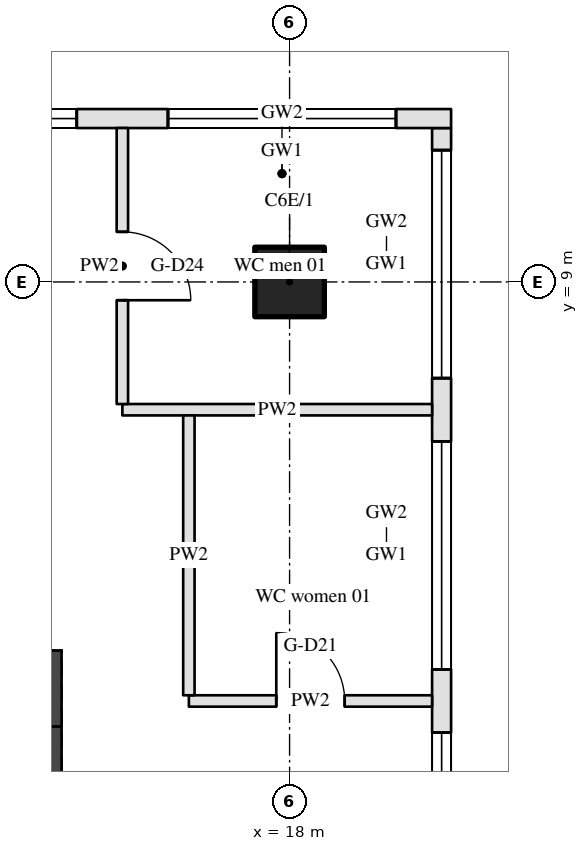
"""IFC4 building model, lengths in metres.
Left out: names, types, materials, properties, quantities, classifications, styles, units other than length and angle.
Written with IfcOpenShell. Run it as: python <this file> out.ifc"""

import sys

from ifc_helpers import new_model, si_unit, direction, frame, frame_2d, origin, origin_2d, place, context, subcontext, project, spatial, rectangle, hollow_circle, extrude, element, fill, save


model = new_model("IFC4")
c1 = context("Model", 3, precision=1e-05, world=origin(), true_north=direction((0.0, 1.0)))
c2 = subcontext(c1, "Body", "Model", "MODEL_VIEW")
j1 = project(units=[si_unit("LENGTHUNIT", "METRE"), si_unit("PLANEANGLEUNIT", "RADIAN")], contexts=[c1])
p1 = place(None, origin())
s1 = spatial("IfcSite", under=j1, at=p1, CompositionType="ELEMENT")
p2 = place(p1, origin())
s2 = spatial("IfcBuilding", under=s1, at=p2, CompositionType="ELEMENT")
p3 = place(p2, origin())
s3 = spatial("IfcBuildingStorey", under=s2, at=p3, CompositionType="ELEMENT", Elevation=0.0)
p4 = place(p3, frame((18.0, 9.0, 0.0), z_axis=(0.0, 0.0, 1.0), x_axis=(1.0, 0.0, 0.0)))
e1 = element("IfcColumn", 1, at=p4, inside=s3, PredefinedType="COLUMN", context=c2, shape_type="SweptSolid", body=[
    extrude(hollow_circle(Radius=0.457, WallThickness=0.05, at=origin_2d()), origin(), (0.0, 0.0, 1.0), 10.8),
])
p5 = place(p3, frame((-15.0, 3.65, 0.0), z_axis=(0.0, 0.0, 1.0), x_axis=(1.0, 0.0, 0.0)))
e2 = element("IfcWall", 2, at=p5, inside=s3, PredefinedType="SHEAR", context=c2, shape_type="SweptSolid", body=[
    extrude(rectangle(XDim=30.0, YDim=1.0, at=frame_2d((15.0, 0.0))), origin(), (0.0, 0.0, 1.0), 10.8),
])
p6 = place(p3, frame((14.5, -11.5, 0.0), z_axis=(0.0, 0.0, 1.0), x_axis=(0.0, 1.0, 0.0)))
e3 = element("IfcWall", 3, at=p6, inside=s3, PredefinedType="SHEAR", context=c2, shape_type="SweptSolid", body=[
    extrude(rectangle(XDim=14.65, YDim=1.0, at=frame_2d((7.325, 0.0))), origin(), (0.0, 0.0, 1.0), 10.8),
])
p7 = place(p6, frame((9.6, 0.0, 0.0)))
e4 = element("IfcOpeningElement", 4, at=p7, cuts=e3, PredefinedType="OPENING", context=c2, shape_type="SweptSolid", body=[
    extrude(rectangle(XDim=1.8, YDim=2.1, at=frame_2d((0.9, 1.05))), frame((0.0, 0.51, 0.0), z_axis=(0.0, -1.0, 0.0), x_axis=(1.0, 0.0, 0.0)), (0.0, 0.0, 1.0), 1.02),
])
p8 = place(p6, frame((4.6, 0.0, 0.0)))
e5 = element("IfcOpeningElement", 5, at=p8, cuts=e3, PredefinedType="OPENING", context=c2, shape_type="SweptSolid", body=[
    extrude(rectangle(XDim=1.8, YDim=2.1, at=frame_2d((0.9, 1.05))), frame((0.0, 0.51, 0.0), z_axis=(0.0, -1.0, 0.0), x_axis=(1.0, 0.0, 0.0)), (0.0, 0.0, 1.0), 1.02),
])
p9 = place(p3, frame((20.0, -19.375, 0.0), z_axis=(0.0, 0.0, 1.0), x_axis=(0.0, 1.0, 0.0)))
e6 = element("IfcWall", 6, at=p9, inside=s3, PredefinedType="STANDARD", context=c2, shape_type="SweptSolid", body=[
    extrude(rectangle(XDim=30.4, YDim=0.25, at=frame_2d((15.2, 0.0))), origin(), (0.0, 0.0, 1.0), 10.0),
])
p10 = place(p9, frame((0.291, 0.0, 0.15)))
e7 = element("IfcOpeningElement", 7, at=p10, cuts=e6, PredefinedType="OPENING", context=c2, shape_type="SweptSolid", body=[
    extrude(rectangle(XDim=3.0, YDim=4.2, at=frame_2d((1.5, 2.1))), frame((0.0, 0.135, 0.0), z_axis=(0.0, -1.0, 0.0), x_axis=(1.0, 0.0, 0.0)), (0.0, 0.0, 1.0), 0.27),
])
p11 = place(p9, frame((0.291, 0.0, 4.95)))
e8 = element("IfcOpeningElement", 8, at=p11, cuts=e6, PredefinedType="OPENING", context=c2, shape_type="SweptSolid", body=[
    extrude(rectangle(XDim=3.0, YDim=4.4, at=frame_2d((1.5, 2.2))), frame((0.0, 0.135, 0.0), z_axis=(0.0, -1.0, 0.0), x_axis=(1.0, 0.0, 0.0)), (0.0, 0.0, 1.0), 0.27),
])
p12 = place(p9, frame((4.122, 0.0, 0.15)))
e9 = element("IfcOpeningElement", 9, at=p12, cuts=e6, PredefinedType="OPENING", context=c2, shape_type="SweptSolid", body=[
    extrude(rectangle(XDim=3.0, YDim=4.2, at=frame_2d((1.5, 2.1))), frame((0.0, 0.135, 0.0), z_axis=(0.0, -1.0, 0.0), x_axis=(1.0, 0.0, 0.0)), (0.0, 0.0, 1.0), 0.27),
])
p13 = place(p9, frame((4.122, 0.0, 4.95)))
e10 = element("IfcOpeningElement", 10, at=p13, cuts=e6, PredefinedType="OPENING", context=c2, shape_type="SweptSolid", body=[
    extrude(rectangle(XDim=3.0, YDim=4.4, at=frame_2d((1.5, 2.2))), frame((0.0, 0.135, 0.0), z_axis=(0.0, -1.0, 0.0), x_axis=(1.0, 0.0, 0.0)), (0.0, 0.0, 1.0), 0.27),
])
p14 = place(p9, frame((7.953, 0.0, 0.15)))
e11 = element("IfcOpeningElement", 11, at=p14, cuts=e6, PredefinedType="OPENING", context=c2, shape_type="SweptSolid", body=[
    extrude(rectangle(XDim=3.0, YDim=4.2, at=frame_2d((1.5, 2.1))), frame((0.0, 0.135, 0.0), z_axis=(0.0, -1.0, 0.0), x_axis=(1.0, 0.0, 0.0)), (0.0, 0.0, 1.0), 0.27),
])
p15 = place(p9, frame((7.953, 0.0, 4.95)))
e12 = element("IfcOpeningElement", 12, at=p15, cuts=e6, PredefinedType="OPENING", context=c2, shape_type="SweptSolid", body=[
    extrude(rectangle(XDim=3.0, YDim=4.4, at=frame_2d((1.5, 2.2))), frame((0.0, 0.135, 0.0), z_axis=(0.0, -1.0, 0.0), x_axis=(1.0, 0.0, 0.0)), (0.0, 0.0, 1.0), 0.27),
])
p16 = place(p9, frame((12.084, 0.0, 0.0)))
e13 = element("IfcOpeningElement", 13, at=p16, cuts=e6, PredefinedType="OPENING", context=c2, shape_type="SweptSolid", body=[
    extrude(rectangle(XDim=2.4, YDim=2.6, at=frame_2d((1.2, 1.3))), frame((0.0, 0.135, 0.0), z_axis=(0.0, -1.0, 0.0), x_axis=(1.0, 0.0, 0.0)), (0.0, 0.0, 1.0), 0.27),
])
p17 = place(p9, frame((11.784, 0.0, 2.9)))
e14 = element("IfcOpeningElement", 14, at=p17, cuts=e6, PredefinedType="OPENING", context=c2, shape_type="SweptSolid", body=[
    extrude(rectangle(XDim=3.0, YDim=1.45, at=frame_2d((1.5, 0.725))), frame((0.0, 0.135, 0.0), z_axis=(0.0, -1.0, 0.0), x_axis=(1.0, 0.0, 0.0)), (0.0, 0.0, 1.0), 0.27),
])
p18 = place(p9, frame((11.784, 0.0, 4.95)))
e15 = element("IfcOpeningElement", 15, at=p18, cuts=e6, PredefinedType="OPENING", context=c2, shape_type="SweptSolid", body=[
    extrude(rectangle(XDim=3.0, YDim=4.4, at=frame_2d((1.5, 2.2))), frame((0.0, 0.135, 0.0), z_axis=(0.0, -1.0, 0.0), x_axis=(1.0, 0.0, 0.0)), (0.0, 0.0, 1.0), 0.27),
])
p19 = place(p9, frame((15.616, 0.0, 0.15)))
e16 = element("IfcOpeningElement", 16, at=p19, cuts=e6, PredefinedType="OPENING", context=c2, shape_type="SweptSolid", body=[
    extrude(rectangle(XDim=3.0, YDim=4.2, at=frame_2d((1.5, 2.1))), frame((0.0, 0.135, 0.0), z_axis=(0.0, -1.0, 0.0), x_axis=(1.0, 0.0, 0.0)), (0.0, 0.0, 1.0), 0.27),
])
p20 = place(p9, frame((15.616, 0.0, 4.95)))
e17 = element("IfcOpeningElement", 17, at=p20, cuts=e6, PredefinedType="OPENING", context=c2, shape_type="SweptSolid", body=[
    extrude(rectangle(XDim=3.0, YDim=4.4, at=frame_2d((1.5, 2.2))), frame((0.0, 0.135, 0.0), z_axis=(0.0, -1.0, 0.0), x_axis=(1.0, 0.0, 0.0)), (0.0, 0.0, 1.0), 0.27),
])
p21 = place(p9, frame((19.447, 0.0, 0.15)))
e18 = element("IfcOpeningElement", 18, at=p21, cuts=e6, PredefinedType="OPENING", context=c2, shape_type="SweptSolid", body=[
    extrude(rectangle(XDim=3.0, YDim=4.2, at=frame_2d((1.5, 2.1))), frame((0.0, 0.135, 0.0), z_axis=(0.0, -1.0, 0.0), x_axis=(1.0, 0.0, 0.0)), (0.0, 0.0, 1.0), 0.27),
])
p22 = place(p9, frame((19.447, 0.0, 4.95)))
e19 = element("IfcOpeningElement", 19, at=p22, cuts=e6, PredefinedType="OPENING", context=c2, shape_type="SweptSolid", body=[
    extrude(rectangle(XDim=3.0, YDim=4.4, at=frame_2d((1.5, 2.2))), frame((0.0, 0.135, 0.0), z_axis=(0.0, -1.0, 0.0), x_axis=(1.0, 0.0, 0.0)), (0.0, 0.0, 1.0), 0.27),
])
p23 = place(p9, frame((23.278, 0.0, 0.15)))
e20 = element("IfcOpeningElement", 20, at=p23, cuts=e6, PredefinedType="OPENING", context=c2, shape_type="SweptSolid", body=[
    extrude(rectangle(XDim=3.0, YDim=4.2, at=frame_2d((1.5, 2.1))), frame((0.0, 0.135, 0.0), z_axis=(0.0, -1.0, 0.0), x_axis=(1.0, 0.0, 0.0)), (0.0, 0.0, 1.0), 0.27),
])
p24 = place(p9, frame((23.278, 0.0, 4.95)))
e21 = element("IfcOpeningElement", 21, at=p24, cuts=e6, PredefinedType="OPENING", context=c2, shape_type="SweptSolid", body=[
    extrude(rectangle(XDim=3.0, YDim=4.4, at=frame_2d((1.5, 2.2))), frame((0.0, 0.135, 0.0), z_axis=(0.0, -1.0, 0.0), x_axis=(1.0, 0.0, 0.0)), (0.0, 0.0, 1.0), 0.27),
])
p25 = place(p9, frame((27.109, 0.0, 0.15)))
e22 = element("IfcOpeningElement", 22, at=p25, cuts=e6, PredefinedType="OPENING", context=c2, shape_type="SweptSolid", body=[
    extrude(rectangle(XDim=3.0, YDim=4.2, at=frame_2d((1.5, 2.1))), frame((0.0, 0.135, 0.0), z_axis=(0.0, -1.0, 0.0), x_axis=(1.0, 0.0, 0.0)), (0.0, 0.0, 1.0), 0.27),
])
p26 = place(p9, frame((27.109, 0.0, 4.95)))
e23 = element("IfcOpeningElement", 23, at=p26, cuts=e6, PredefinedType="OPENING", context=c2, shape_type="SweptSolid", body=[
    extrude(rectangle(XDim=3.0, YDim=4.4, at=frame_2d((1.5, 2.2))), frame((0.0, 0.135, 0.0), z_axis=(0.0, -1.0, 0.0), x_axis=(1.0, 0.0, 0.0)), (0.0, 0.0, 1.0), 0.27),
])
p27 = place(p3, frame((20.125, 11.15, 0.0), z_axis=(0.0, 0.0, 1.0), x_axis=(-1.0, 0.0, 0.0)))
e24 = element("IfcWall", 24, at=p27, inside=s3, PredefinedType="STANDARD", context=c2, shape_type="SweptSolid", body=[
    extrude(rectangle(XDim=42.25, YDim=0.25, at=frame_2d((21.125, 0.0))), origin(), (0.0, 0.0, 1.0), 10.0),
])
p28 = place(p27, frame((0.725, 0.0, 0.15)))
e25 = element("IfcOpeningElement", 25, at=p28, cuts=e24, PredefinedType="OPENING", context=c2, shape_type="SweptSolid", body=[
    extrude(rectangle(XDim=3.0, YDim=4.2, at=frame_2d((1.5, 2.1))), frame((0.0, 0.135, 0.0), z_axis=(0.0, -1.0, 0.0), x_axis=(1.0, 0.0, 0.0)), (0.0, 0.0, 1.0), 0.27),
])
p29 = place(p27, frame((0.725, 0.0, 4.95)))
e26 = element("IfcOpeningElement", 26, at=p29, cuts=e24, PredefinedType="OPENING", context=c2, shape_type="SweptSolid", body=[
    extrude(rectangle(XDim=3.0, YDim=4.4, at=frame_2d((1.5, 2.2))), frame((0.0, 0.135, 0.0), z_axis=(0.0, -1.0, 0.0), x_axis=(1.0, 0.0, 0.0)), (0.0, 0.0, 1.0), 0.27),
])
p30 = place(p27, frame((4.925, 0.0, 0.15)))
e27 = element("IfcOpeningElement", 27, at=p30, cuts=e24, PredefinedType="OPENING", context=c2, shape_type="SweptSolid", body=[
    extrude(rectangle(XDim=3.0, YDim=4.2, at=frame_2d((1.5, 2.1))), frame((0.0, 0.135, 0.0), z_axis=(0.0, -1.0, 0.0), x_axis=(1.0, 0.0, 0.0)), (0.0, 0.0, 1.0), 0.27),
])
p31 = place(p27, frame((4.925, 0.0, 4.95)))
e28 = element("IfcOpeningElement", 28, at=p31, cuts=e24, PredefinedType="OPENING", context=c2, shape_type="SweptSolid", body=[
    extrude(rectangle(XDim=3.0, YDim=4.4, at=frame_2d((1.5, 2.2))), frame((0.0, 0.135, 0.0), z_axis=(0.0, -1.0, 0.0), x_axis=(1.0, 0.0, 0.0)), (0.0, 0.0, 1.0), 0.27),
])
p32 = place(p27, frame((9.125, 0.0, 0.15)))
e29 = element("IfcOpeningElement", 29, at=p32, cuts=e24, PredefinedType="OPENING", context=c2, shape_type="SweptSolid", body=[
    extrude(rectangle(XDim=3.0, YDim=4.2, at=frame_2d((1.5, 2.1))), frame((0.0, 0.135, 0.0), z_axis=(0.0, -1.0, 0.0), x_axis=(1.0, 0.0, 0.0)), (0.0, 0.0, 1.0), 0.27),
])
p33 = place(p27, frame((9.125, 0.0, 4.95)))
e30 = element("IfcOpeningElement", 30, at=p33, cuts=e24, PredefinedType="OPENING", context=c2, shape_type="SweptSolid", body=[
    extrude(rectangle(XDim=3.0, YDim=4.4, at=frame_2d((1.5, 2.2))), frame((0.0, 0.135, 0.0), z_axis=(0.0, -1.0, 0.0), x_axis=(1.0, 0.0, 0.0)), (0.0, 0.0, 1.0), 0.27),
])
p34 = place(p27, frame((13.925, 0.0, 0.0)))
e31 = element("IfcOpeningElement", 31, at=p34, cuts=e24, PredefinedType="OPENING", context=c2, shape_type="SweptSolid", body=[
    extrude(rectangle(XDim=1.8, YDim=2.4, at=frame_2d((0.9, 1.2))), frame((0.0, 0.135, 0.0), z_axis=(0.0, -1.0, 0.0), x_axis=(1.0, 0.0, 0.0)), (0.0, 0.0, 1.0), 0.27),
])
p35 = place(p27, frame((17.525, 0.0, 0.15)))
e32 = element("IfcOpeningElement", 32, at=p35, cuts=e24, PredefinedType="OPENING", context=c2, shape_type="SweptSolid", body=[
    extrude(rectangle(XDim=3.0, YDim=4.2, at=frame_2d((1.5, 2.1))), frame((0.0, 0.135, 0.0), z_axis=(0.0, -1.0, 0.0), x_axis=(1.0, 0.0, 0.0)), (0.0, 0.0, 1.0), 0.27),
])
p36 = place(p27, frame((17.525, 0.0, 4.95)))
e33 = element("IfcOpeningElement", 33, at=p36, cuts=e24, PredefinedType="OPENING", context=c2, shape_type="SweptSolid", body=[
    extrude(rectangle(XDim=3.0, YDim=4.4, at=frame_2d((1.5, 2.2))), frame((0.0, 0.135, 0.0), z_axis=(0.0, -1.0, 0.0), x_axis=(1.0, 0.0, 0.0)), (0.0, 0.0, 1.0), 0.27),
])
p37 = place(p27, frame((21.725, 0.0, 0.15)))
e34 = element("IfcOpeningElement", 34, at=p37, cuts=e24, PredefinedType="OPENING", context=c2, shape_type="SweptSolid", body=[
    extrude(rectangle(XDim=3.0, YDim=4.2, at=frame_2d((1.5, 2.1))), frame((0.0, 0.135, 0.0), z_axis=(0.0, -1.0, 0.0), x_axis=(1.0, 0.0, 0.0)), (0.0, 0.0, 1.0), 0.27),
])
p38 = place(p27, frame((21.725, 0.0, 4.95)))
e35 = element("IfcOpeningElement", 35, at=p38, cuts=e24, PredefinedType="OPENING", context=c2, shape_type="SweptSolid", body=[
    extrude(rectangle(XDim=3.0, YDim=4.4, at=frame_2d((1.5, 2.2))), frame((0.0, 0.135, 0.0), z_axis=(0.0, -1.0, 0.0), x_axis=(1.0, 0.0, 0.0)), (0.0, 0.0, 1.0), 0.27),
])
p39 = place(p27, frame((26.225, 0.0, 0.0)))
e36 = element("IfcOpeningElement", 36, at=p39, cuts=e24, PredefinedType="OPENING", context=c2, shape_type="SweptSolid", body=[
    extrude(rectangle(XDim=2.4, YDim=2.6, at=frame_2d((1.2, 1.3))), frame((0.0, 0.135, 0.0), z_axis=(0.0, -1.0, 0.0), x_axis=(1.0, 0.0, 0.0)), (0.0, 0.0, 1.0), 0.27),
])
p40 = place(p27, frame((25.925, 0.0, 2.9)))
e37 = element("IfcOpeningElement", 37, at=p40, cuts=e24, PredefinedType="OPENING", context=c2, shape_type="SweptSolid", body=[
    extrude(rectangle(XDim=3.0, YDim=1.45, at=frame_2d((1.5, 0.725))), frame((0.0, 0.135, 0.0), z_axis=(0.0, -1.0, 0.0), x_axis=(1.0, 0.0, 0.0)), (0.0, 0.0, 1.0), 0.27),
])
p41 = place(p27, frame((25.925, 0.0, 4.95)))
e38 = element("IfcOpeningElement", 38, at=p41, cuts=e24, PredefinedType="OPENING", context=c2, shape_type="SweptSolid", body=[
    extrude(rectangle(XDim=3.0, YDim=4.4, at=frame_2d((1.5, 2.2))), frame((0.0, 0.135, 0.0), z_axis=(0.0, -1.0, 0.0), x_axis=(1.0, 0.0, 0.0)), (0.0, 0.0, 1.0), 0.27),
])
p42 = place(p27, frame((30.125, 0.0, 0.15)))
e39 = element("IfcOpeningElement", 39, at=p42, cuts=e24, PredefinedType="OPENING", context=c2, shape_type="SweptSolid", body=[
    extrude(rectangle(XDim=3.0, YDim=4.2, at=frame_2d((1.5, 2.1))), frame((0.0, 0.135, 0.0), z_axis=(0.0, -1.0, 0.0), x_axis=(1.0, 0.0, 0.0)), (0.0, 0.0, 1.0), 0.27),
])
p43 = place(p27, frame((30.125, 0.0, 4.95)))
e40 = element("IfcOpeningElement", 40, at=p43, cuts=e24, PredefinedType="OPENING", context=c2, shape_type="SweptSolid", body=[
    extrude(rectangle(XDim=3.0, YDim=4.4, at=frame_2d((1.5, 2.2))), frame((0.0, 0.135, 0.0), z_axis=(0.0, -1.0, 0.0), x_axis=(1.0, 0.0, 0.0)), (0.0, 0.0, 1.0), 0.27),
])
p44 = place(p27, frame((34.325, 0.0, 0.15)))
e41 = element("IfcOpeningElement", 41, at=p44, cuts=e24, PredefinedType="OPENING", context=c2, shape_type="SweptSolid", body=[
    extrude(rectangle(XDim=3.0, YDim=4.2, at=frame_2d((1.5, 2.1))), frame((0.0, 0.135, 0.0), z_axis=(0.0, -1.0, 0.0), x_axis=(1.0, 0.0, 0.0)), (0.0, 0.0, 1.0), 0.27),
])
p45 = place(p27, frame((34.325, 0.0, 4.95)))
e42 = element("IfcOpeningElement", 42, at=p45, cuts=e24, PredefinedType="OPENING", context=c2, shape_type="SweptSolid", body=[
    extrude(rectangle(XDim=3.0, YDim=4.4, at=frame_2d((1.5, 2.2))), frame((0.0, 0.135, 0.0), z_axis=(0.0, -1.0, 0.0), x_axis=(1.0, 0.0, 0.0)), (0.0, 0.0, 1.0), 0.27),
])
p46 = place(p27, frame((38.525, 0.0, 0.15)))
e43 = element("IfcOpeningElement", 43, at=p46, cuts=e24, PredefinedType="OPENING", context=c2, shape_type="SweptSolid", body=[
    extrude(rectangle(XDim=3.0, YDim=4.2, at=frame_2d((1.5, 2.1))), frame((0.0, 0.135, 0.0), z_axis=(0.0, -1.0, 0.0), x_axis=(1.0, 0.0, 0.0)), (0.0, 0.0, 1.0), 0.27),
])
p47 = place(p27, frame((38.525, 0.0, 4.95)))
e44 = element("IfcOpeningElement", 44, at=p47, cuts=e24, PredefinedType="OPENING", context=c2, shape_type="SweptSolid", body=[
    extrude(rectangle(XDim=3.0, YDim=4.4, at=frame_2d((1.5, 2.2))), frame((0.0, 0.135, 0.0), z_axis=(0.0, -1.0, 0.0), x_axis=(1.0, 0.0, 0.0)), (0.0, 0.0, 1.0), 0.27),
])
p48 = place(p3, frame((16.675, 3.487, 0.0), z_axis=(0.0, 0.0, 1.0), x_axis=(1.0, 0.0, 0.0)))
e45 = element("IfcWall", 45, at=p48, inside=s3, PredefinedType="PARTITIONING", context=c2, shape_type="SweptSolid", body=[
    extrude(rectangle(XDim=3.2, YDim=0.15, at=frame_2d((1.6, 0.0))), origin(), (0.0, 0.0, 1.0), 9.86),
])
p49 = place(p48, frame((1.15, 0.0, 0.0)))
e46 = element("IfcOpeningElement", 46, at=p49, cuts=e45, PredefinedType="OPENING", context=c2, shape_type="SweptSolid", body=[
    extrude(rectangle(XDim=0.9, YDim=2.1, at=frame_2d((0.45, 1.05))), frame((0.0, 0.085, 0.0), z_axis=(0.0, -1.0, 0.0), x_axis=(1.0, 0.0, 0.0)), (0.0, 0.0, 1.0), 0.17),
])
p50 = place(p3, frame((15.8, 7.319, 0.0), z_axis=(0.0, 0.0, 1.0), x_axis=(1.0, 0.0, 0.0)))
e47 = element("IfcWall", 47, at=p50, inside=s3, PredefinedType="PARTITIONING", context=c2, shape_type="SweptSolid", body=[
    extrude(rectangle(XDim=4.075, YDim=0.15, at=frame_2d((2.038, 0.0))), origin(), (0.0, 0.0, 1.0), 9.86),
])
p51 = place(p3, frame((15.8, 11.025, 0.0), z_axis=(0.0, 0.0, 1.0), x_axis=(0.0, -1.0, 0.0)))
e48 = element("IfcWall", 48, at=p51, inside=s3, PredefinedType="PARTITIONING", context=c2, shape_type="SweptSolid", body=[
    extrude(rectangle(XDim=3.631, YDim=0.15, at=frame_2d((1.815, 0.0))), origin(), (0.0, 0.0, 1.0), 9.86),
])
p52 = place(p51, frame((1.365, 0.0, 0.0)))
e49 = element("IfcOpeningElement", 49, at=p52, cuts=e48, PredefinedType="OPENING", context=c2, shape_type="SweptSolid", body=[
    extrude(rectangle(XDim=0.9, YDim=2.1, at=frame_2d((0.45, 1.05))), frame((0.0, 0.085, 0.0), z_axis=(0.0, -1.0, 0.0), x_axis=(1.0, 0.0, 0.0)), (0.0, 0.0, 1.0), 0.17),
])
p53 = place(p3, frame((16.675, 3.562, 0.0), z_axis=(0.0, 0.0, 1.0), x_axis=(0.0, 1.0, 0.0)))
e50 = element("IfcWall", 50, at=p53, inside=s3, PredefinedType="PARTITIONING", context=c2, shape_type="SweptSolid", body=[
    extrude(rectangle(XDim=3.682, YDim=0.15, at=frame_2d((1.841, 0.0))), origin(), (0.0, 0.0, 1.0), 9.86),
])
p54 = place(p21, origin())
e51 = element("IfcWindow", 51, at=p54, inside=s3, PartitioningType="DOUBLE_PANEL_HORIZONTAL", PredefinedType="WINDOW", context=c2, shape_type="SweptSolid", body=[
    extrude(rectangle(XDim=3.0, YDim=4.2, at=frame_2d((1.5, 2.1))), frame((0.0, 0.03, 0.0), z_axis=(0.0, -1.0, 0.0), x_axis=(1.0, 0.0, 0.0)), (0.0, 0.0, 1.0), 0.06),
])
fill(e18, e51)
p55 = place(p22, origin())
e52 = element("IfcWindow", 52, at=p55, inside=s3, PartitioningType="DOUBLE_PANEL_HORIZONTAL", PredefinedType="WINDOW", context=c2, shape_type="SweptSolid", body=[
    extrude(rectangle(XDim=3.0, YDim=4.4, at=frame_2d((1.5, 2.2))), frame((0.0, 0.03, 0.0), z_axis=(0.0, -1.0, 0.0), x_axis=(1.0, 0.0, 0.0)), (0.0, 0.0, 1.0), 0.06),
])
fill(e19, e52)
p56 = place(p23, origin())
e53 = element("IfcWindow", 53, at=p56, inside=s3, PartitioningType="DOUBLE_PANEL_HORIZONTAL", PredefinedType="WINDOW", context=c2, shape_type="SweptSolid", body=[
    extrude(rectangle(XDim=3.0, YDim=4.2, at=frame_2d((1.5, 2.1))), frame((0.0, 0.03, 0.0), z_axis=(0.0, -1.0, 0.0), x_axis=(1.0, 0.0, 0.0)), (0.0, 0.0, 1.0), 0.06),
])
fill(e20, e53)
p57 = place(p24, origin())
e54 = element("IfcWindow", 54, at=p57, inside=s3, PartitioningType="DOUBLE_PANEL_HORIZONTAL", PredefinedType="WINDOW", context=c2, shape_type="SweptSolid", body=[
    extrude(rectangle(XDim=3.0, YDim=4.4, at=frame_2d((1.5, 2.2))), frame((0.0, 0.03, 0.0), z_axis=(0.0, -1.0, 0.0), x_axis=(1.0, 0.0, 0.0)), (0.0, 0.0, 1.0), 0.06),
])
fill(e21, e54)
p58 = place(p25, origin())
e55 = element("IfcWindow", 55, at=p58, inside=s3, PartitioningType="DOUBLE_PANEL_HORIZONTAL", PredefinedType="WINDOW", context=c2, shape_type="SweptSolid", body=[
    extrude(rectangle(XDim=3.0, YDim=4.2, at=frame_2d((1.5, 2.1))), frame((0.0, 0.03, 0.0), z_axis=(0.0, -1.0, 0.0), x_axis=(1.0, 0.0, 0.0)), (0.0, 0.0, 1.0), 0.06),
])
fill(e22, e55)
p59 = place(p26, origin())
e56 = element("IfcWindow", 56, at=p59, inside=s3, PartitioningType="DOUBLE_PANEL_HORIZONTAL", PredefinedType="WINDOW", context=c2, shape_type="SweptSolid", body=[
    extrude(rectangle(XDim=3.0, YDim=4.4, at=frame_2d((1.5, 2.2))), frame((0.0, 0.03, 0.0), z_axis=(0.0, -1.0, 0.0), x_axis=(1.0, 0.0, 0.0)), (0.0, 0.0, 1.0), 0.06),
])
fill(e23, e56)
p60 = place(p28, origin())
e57 = element("IfcWindow", 57, at=p60, inside=s3, PartitioningType="DOUBLE_PANEL_HORIZONTAL", PredefinedType="WINDOW", context=c2, shape_type="SweptSolid", body=[
    extrude(rectangle(XDim=3.0, YDim=4.2, at=frame_2d((1.5, 2.1))), frame((0.0, 0.03, 0.0), z_axis=(0.0, -1.0, 0.0), x_axis=(1.0, 0.0, 0.0)), (0.0, 0.0, 1.0), 0.06),
])
fill(e25, e57)
p61 = place(p29, origin())
e58 = element("IfcWindow", 58, at=p61, inside=s3, PartitioningType="DOUBLE_PANEL_HORIZONTAL", PredefinedType="WINDOW", context=c2, shape_type="SweptSolid", body=[
    extrude(rectangle(XDim=3.0, YDim=4.4, at=frame_2d((1.5, 2.2))), frame((0.0, 0.03, 0.0), z_axis=(0.0, -1.0, 0.0), x_axis=(1.0, 0.0, 0.0)), (0.0, 0.0, 1.0), 0.06),
])
fill(e26, e58)
p62 = place(p30, origin())
e59 = element("IfcWindow", 59, at=p62, inside=s3, PartitioningType="DOUBLE_PANEL_HORIZONTAL", PredefinedType="WINDOW", context=c2, shape_type="SweptSolid", body=[
    extrude(rectangle(XDim=3.0, YDim=4.2, at=frame_2d((1.5, 2.1))), frame((0.0, 0.03, 0.0), z_axis=(0.0, -1.0, 0.0), x_axis=(1.0, 0.0, 0.0)), (0.0, 0.0, 1.0), 0.06),
])
fill(e27, e59)
p63 = place(p31, origin())
e60 = element("IfcWindow", 60, at=p63, inside=s3, PartitioningType="DOUBLE_PANEL_HORIZONTAL", PredefinedType="WINDOW", context=c2, shape_type="SweptSolid", body=[
    extrude(rectangle(XDim=3.0, YDim=4.4, at=frame_2d((1.5, 2.2))), frame((0.0, 0.03, 0.0), z_axis=(0.0, -1.0, 0.0), x_axis=(1.0, 0.0, 0.0)), (0.0, 0.0, 1.0), 0.06),
])
fill(e28, e60)
p64 = place(p49, origin())
e61 = element("IfcDoor", 61, at=p64, inside=s3, OperationType="SINGLE_SWING_LEFT", PredefinedType="DOOR", context=c2, shape_type="SweptSolid", body=[
    extrude(rectangle(XDim=0.9, YDim=2.1, at=frame_2d((0.45, 1.05))), frame((0.0, 0.025, 0.0), z_axis=(0.0, -1.0, 0.0), x_axis=(1.0, 0.0, 0.0)), (0.0, 0.0, 1.0), 0.05),
])
fill(e46, e61)
p65 = place(p52, origin())
e62 = element("IfcDoor", 62, at=p65, inside=s3, OperationType="SINGLE_SWING_RIGHT", PredefinedType="DOOR", context=c2, shape_type="SweptSolid", body=[
    extrude(rectangle(XDim=0.9, YDim=2.1, at=frame_2d((0.45, 1.05))), frame((0.0, 0.025, 0.0), z_axis=(0.0, -1.0, 0.0), x_axis=(1.0, 0.0, 0.0)), (0.0, 0.0, 1.0), 0.05),
])
fill(e49, e62)
save(model, sys.argv[1])
